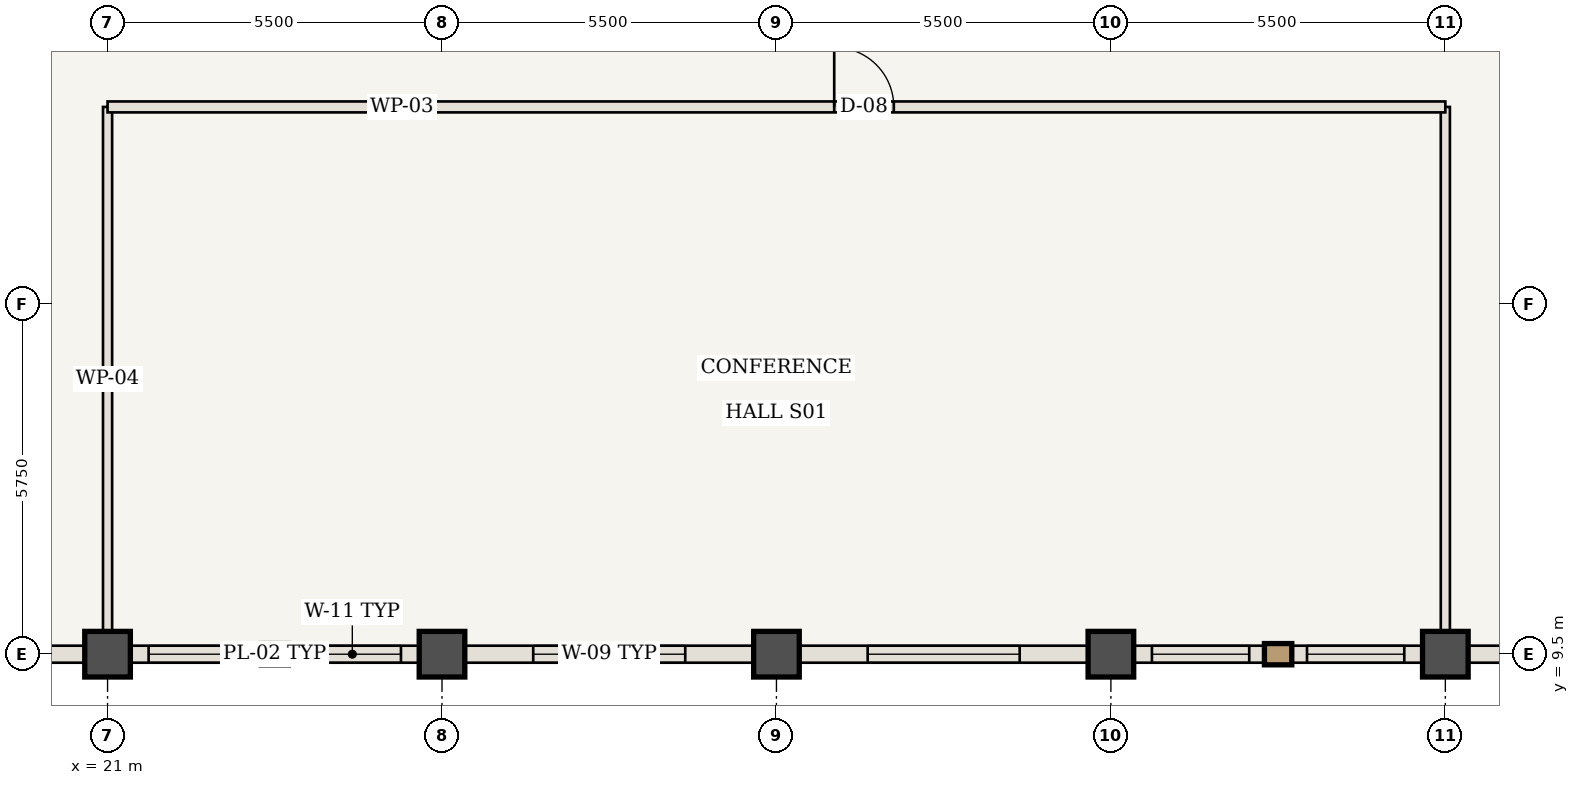
"""IFC4 building model, lengths in metres.
Left out: names, types, materials, properties, quantities, classifications, styles, units other than length and angle.
Written with IfcOpenShell. Run it as: python <this file> out.ifc"""

import sys

from ifc_helpers import new_model, si_unit, direction, frame, frame_2d, origin, origin_2d, place, context, subcontext, project, spatial, rectangle, extrude, element, fill, save


model = new_model("IFC4")
c1 = context("Model", 3, precision=1e-05, world=origin(), true_north=direction((0.0, 1.0)))
c2 = subcontext(c1, "Body", "Model", "MODEL_VIEW")
j1 = project(units=[si_unit("LENGTHUNIT", "METRE"), si_unit("PLANEANGLEUNIT", "RADIAN")], contexts=[c1])
p1 = place(None, origin())
s1 = spatial("IfcSite", under=j1, at=p1, CompositionType="ELEMENT")
p2 = place(p1, origin())
s2 = spatial("IfcBuilding", under=s1, at=p2, CompositionType="ELEMENT")
p3 = place(p2, frame((0.0, 0.0, 281.4)))
s3 = spatial("IfcBuildingStorey", under=s2, at=p3, CompositionType="ELEMENT", Elevation=281.4)
for number, where, z_axis, x_axis in (
    (1, (21.0, 9.5, 0.0), (0.0, 0.0, 1.0), (1.0, 0.0, 0.0)),
    (2, (26.5, 9.5, 0.0), (0.0, 0.0, 1.0), (1.0, 0.0, 0.0)),
    (3, (32.0, 9.5, 0.0), (0.0, 0.0, 1.0), (1.0, 0.0, 0.0)),
    (4, (37.5, 9.5, 0.0), (0.0, 0.0, 1.0), (1.0, 0.0, 0.0)),
    (5, (43.0, 9.5, 0.0), (0.0, 0.0, 1.0), (1.0, 0.0, 0.0)),
):
    element("IfcColumn", number, at=place(p3, frame(where, z_axis=z_axis, x_axis=x_axis)), inside=s3, PredefinedType="COLUMN", context=c2, shape_type="SweptSolid", body=[
        extrude(rectangle(XDim=0.75, YDim=0.75, at=origin_2d()), origin(), (0.0, 0.0, 1.0), 3.85),
    ])
for number, where, z_axis, x_axis in (
    (6, (21.0, 9.56, 0.0), (0.0, 0.0, 1.0), (0.0, 1.0, 0.0)),
    (7, (43.0, 9.56, 0.0), (0.0, 0.0, 1.0), (0.0, 1.0, 0.0)),
):
    element("IfcWall", number, at=place(p3, frame(where, z_axis=z_axis, x_axis=x_axis)), inside=s3, PredefinedType="STANDARD", context=c2, shape_type="SweptSolid", body=[
        extrude(rectangle(XDim=8.94, YDim=0.15, at=frame_2d((4.47, 0.0))), origin(), (0.0, 0.0, 1.0), 3.685),
    ])
p4 = place(p3, frame((21.0, 18.5, 0.0), z_axis=(0.0, 0.0, 1.0), x_axis=(1.0, 0.0, 0.0)))
e8 = element("IfcWall", 8, at=p4, inside=s3, PredefinedType="STANDARD", context=c2, shape_type="SweptSolid", body=[
    extrude(rectangle(XDim=22.0, YDim=0.18, at=frame_2d((11.0, 0.0))), origin(), (0.0, 0.0, 1.0), 3.685),
])
p5 = place(p4, frame((11.95, 0.0, 0.0)))
e9 = element("IfcOpeningElement", 9, at=p5, cuts=e8, PredefinedType="OPENING", context=c2, shape_type="SweptSolid", body=[
    extrude(rectangle(XDim=0.98, YDim=2.2, at=frame_2d((0.49, 1.1))), frame((0.0, 0.1, 0.0), z_axis=(0.0, -1.0, 0.0), x_axis=(1.0, 0.0, 0.0)), (0.0, 0.0, 1.0), 0.2),
])
p6 = place(p3, frame((21.0, 9.5, 0.0), z_axis=(0.0, 0.0, 1.0), x_axis=(-1.0, 0.0, 0.0)))
e10 = element("IfcWall", 10, at=p6, inside=s3, PredefinedType="USERDEFINED", context=c2, shape_type="SweptSolid", body=[
    extrude(rectangle(XDim=5.5, YDim=0.28, at=frame_2d((2.75, 0.0))), origin(), (0.0, 0.0, 1.0), 2.985),
])
p7 = place(p3, frame((26.5, 9.5, 0.0), z_axis=(0.0, 0.0, 1.0), x_axis=(-1.0, 0.0, 0.0)))
e11 = element("IfcWall", 11, at=p7, inside=s3, PredefinedType="USERDEFINED", context=c2, shape_type="SweptSolid", body=[
    extrude(rectangle(XDim=5.5, YDim=0.28, at=frame_2d((2.75, 0.0))), origin(), (0.0, 0.0, 1.0), 2.985),
])
p8 = place(p7, frame((0.675, 0.0, 0.85)))
e12 = element("IfcOpeningElement", 12, at=p8, cuts=e11, PredefinedType="OPENING", context=c2, shape_type="SweptSolid", body=[
    extrude(rectangle(XDim=1.6, YDim=1.935, at=frame_2d((0.8, 0.968))), frame((0.0, 0.15, 0.0), z_axis=(0.0, -1.0, 0.0), x_axis=(1.0, 0.0, 0.0)), (0.0, 0.0, 1.0), 0.3),
])
p9 = place(p7, frame((3.225, 0.0, 0.85)))
e13 = element("IfcOpeningElement", 13, at=p9, cuts=e11, PredefinedType="OPENING", context=c2, shape_type="SweptSolid", body=[
    extrude(rectangle(XDim=1.6, YDim=1.935, at=frame_2d((0.8, 0.968))), frame((0.0, 0.15, 0.0), z_axis=(0.0, -1.0, 0.0), x_axis=(1.0, 0.0, 0.0)), (0.0, 0.0, 1.0), 0.3),
])
p10 = place(p3, frame((32.0, 9.5, 0.0), z_axis=(0.0, 0.0, 1.0), x_axis=(-1.0, 0.0, 0.0)))
e14 = element("IfcWall", 14, at=p10, inside=s3, PredefinedType="USERDEFINED", context=c2, shape_type="SweptSolid", body=[
    extrude(rectangle(XDim=5.5, YDim=0.28, at=frame_2d((2.75, 0.0))), origin(), (0.0, 0.0, 1.0), 2.985),
])
p11 = place(p10, frame((1.5, 0.0, 0.85)))
e15 = element("IfcOpeningElement", 15, at=p11, cuts=e14, PredefinedType="OPENING", context=c2, shape_type="SweptSolid", body=[
    extrude(rectangle(XDim=2.5, YDim=1.935, at=frame_2d((1.25, 0.968))), frame((0.0, 0.15, 0.0), z_axis=(0.0, -1.0, 0.0), x_axis=(1.0, 0.0, 0.0)), (0.0, 0.0, 1.0), 0.3),
])
p12 = place(p3, frame((37.5, 9.5, 0.0), z_axis=(0.0, 0.0, 1.0), x_axis=(-1.0, 0.0, 0.0)))
e16 = element("IfcWall", 16, at=p12, inside=s3, PredefinedType="USERDEFINED", context=c2, shape_type="SweptSolid", body=[
    extrude(rectangle(XDim=5.5, YDim=0.28, at=frame_2d((2.75, 0.0))), origin(), (0.0, 0.0, 1.0), 2.985),
])
p13 = place(p12, frame((1.5, 0.0, 0.85)))
e17 = element("IfcOpeningElement", 17, at=p13, cuts=e16, PredefinedType="OPENING", context=c2, shape_type="SweptSolid", body=[
    extrude(rectangle(XDim=2.5, YDim=1.935, at=frame_2d((1.25, 0.968))), frame((0.0, 0.15, 0.0), z_axis=(0.0, -1.0, 0.0), x_axis=(1.0, 0.0, 0.0)), (0.0, 0.0, 1.0), 0.3),
])
p14 = place(p3, frame((43.0, 9.5, 0.0), z_axis=(0.0, 0.0, 1.0), x_axis=(-1.0, 0.0, 0.0)))
e18 = element("IfcWall", 18, at=p14, inside=s3, PredefinedType="USERDEFINED", context=c2, shape_type="SweptSolid", body=[
    extrude(rectangle(XDim=5.5, YDim=0.28, at=frame_2d((2.75, 0.0))), origin(), (0.0, 0.0, 1.0), 2.985),
])
p15 = place(p14, frame((0.675, 0.0, 0.85)))
e19 = element("IfcOpeningElement", 19, at=p15, cuts=e18, PredefinedType="OPENING", context=c2, shape_type="SweptSolid", body=[
    extrude(rectangle(XDim=1.6, YDim=1.935, at=frame_2d((0.8, 0.968))), frame((0.0, 0.15, 0.0), z_axis=(0.0, -1.0, 0.0), x_axis=(1.0, 0.0, 0.0)), (0.0, 0.0, 1.0), 0.3),
])
p16 = place(p14, frame((3.225, 0.0, 0.85)))
e20 = element("IfcOpeningElement", 20, at=p16, cuts=e18, PredefinedType="OPENING", context=c2, shape_type="SweptSolid", body=[
    extrude(rectangle(XDim=1.6, YDim=1.935, at=frame_2d((0.8, 0.968))), frame((0.0, 0.15, 0.0), z_axis=(0.0, -1.0, 0.0), x_axis=(1.0, 0.0, 0.0)), (0.0, 0.0, 1.0), 0.3),
])
p17 = place(p3, frame((48.5, 9.5, 0.0), z_axis=(0.0, 0.0, 1.0), x_axis=(-1.0, 0.0, 0.0)))
e21 = element("IfcWall", 21, at=p17, inside=s3, PredefinedType="USERDEFINED", context=c2, shape_type="SweptSolid", body=[
    extrude(rectangle(XDim=5.5, YDim=0.28, at=frame_2d((2.75, 0.0))), origin(), (0.0, 0.0, 1.0), 2.985),
])
p18 = place(p5, origin())
e22 = element("IfcDoor", 22, at=p18, inside=s3, OperationType="SINGLE_SWING_LEFT", PredefinedType="DOOR", context=c2, shape_type="SweptSolid", body=[
    extrude(rectangle(XDim=0.98, YDim=2.2, at=frame_2d((0.49, 1.1))), frame((0.0, 0.025, 0.0), z_axis=(0.0, -1.0, 0.0), x_axis=(1.0, 0.0, 0.0)), (0.0, 0.0, 1.0), 0.05),
])
fill(e9, e22)
p19 = place(p8, origin())
e23 = element("IfcWindow", 23, at=p19, inside=s3, PartitioningType="SINGLE_PANEL", PredefinedType="WINDOW", context=c2, shape_type="SweptSolid", body=[
    extrude(rectangle(XDim=1.6, YDim=1.935, at=frame_2d((0.8, 0.968))), frame((0.0, 0.03, 0.0), z_axis=(0.0, -1.0, 0.0), x_axis=(1.0, 0.0, 0.0)), (0.0, 0.0, 1.0), 0.06),
])
fill(e12, e23)
p20 = place(p9, origin())
e24 = element("IfcWindow", 24, at=p20, inside=s3, PartitioningType="SINGLE_PANEL", PredefinedType="WINDOW", context=c2, shape_type="SweptSolid", body=[
    extrude(rectangle(XDim=1.6, YDim=1.935, at=frame_2d((0.8, 0.968))), frame((0.0, 0.03, 0.0), z_axis=(0.0, -1.0, 0.0), x_axis=(1.0, 0.0, 0.0)), (0.0, 0.0, 1.0), 0.06),
])
fill(e13, e24)
p21 = place(p11, origin())
e25 = element("IfcWindow", 25, at=p21, inside=s3, PartitioningType="SINGLE_PANEL", PredefinedType="WINDOW", context=c2, shape_type="SweptSolid", body=[
    extrude(rectangle(XDim=2.5, YDim=1.935, at=frame_2d((1.25, 0.968))), frame((0.0, 0.03, 0.0), z_axis=(0.0, -1.0, 0.0), x_axis=(1.0, 0.0, 0.0)), (0.0, 0.0, 1.0), 0.06),
])
fill(e15, e25)
p22 = place(p13, origin())
e26 = element("IfcWindow", 26, at=p22, inside=s3, PartitioningType="SINGLE_PANEL", PredefinedType="WINDOW", context=c2, shape_type="SweptSolid", body=[
    extrude(rectangle(XDim=2.5, YDim=1.935, at=frame_2d((1.25, 0.968))), frame((0.0, 0.03, 0.0), z_axis=(0.0, -1.0, 0.0), x_axis=(1.0, 0.0, 0.0)), (0.0, 0.0, 1.0), 0.06),
])
fill(e17, e26)
p23 = place(p15, origin())
e27 = element("IfcWindow", 27, at=p23, inside=s3, PartitioningType="SINGLE_PANEL", PredefinedType="WINDOW", context=c2, shape_type="SweptSolid", body=[
    extrude(rectangle(XDim=1.6, YDim=1.935, at=frame_2d((0.8, 0.968))), frame((0.0, 0.03, 0.0), z_axis=(0.0, -1.0, 0.0), x_axis=(1.0, 0.0, 0.0)), (0.0, 0.0, 1.0), 0.06),
])
fill(e19, e27)
p24 = place(p16, origin())
e28 = element("IfcWindow", 28, at=p24, inside=s3, PartitioningType="SINGLE_PANEL", PredefinedType="WINDOW", context=c2, shape_type="SweptSolid", body=[
    extrude(rectangle(XDim=1.6, YDim=1.935, at=frame_2d((0.8, 0.968))), frame((0.0, 0.03, 0.0), z_axis=(0.0, -1.0, 0.0), x_axis=(1.0, 0.0, 0.0)), (0.0, 0.0, 1.0), 0.06),
])
fill(e20, e28)
save(model, sys.argv[1])
